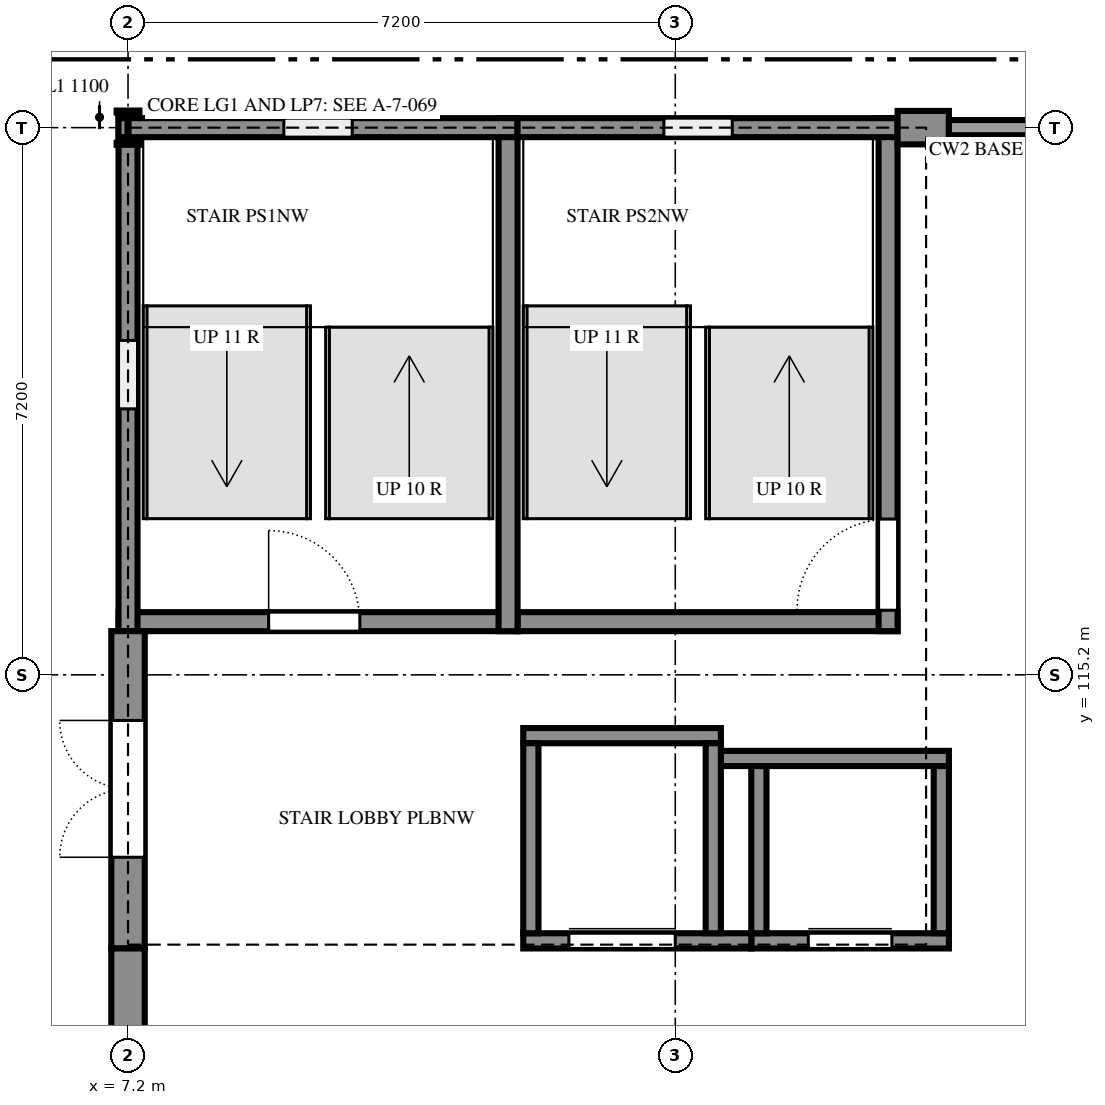
"""IFC4 building model, lengths in metres.
Left out: names, types, materials, properties, quantities, classifications, styles, units other than length and angle.
Written with IfcOpenShell. Run it as: python <this file> out.ifc"""

import sys

from ifc_helpers import new_model, si_unit, direction, frame, frame_2d, origin, origin_2d, place, context, subcontext, project, spatial, rectangle, i_section, extrude, element, fill, save


model = new_model("IFC4")
c1 = context("Model", 3, precision=1e-05, world=origin(), true_north=direction((0.0, 1.0)))
c2 = subcontext(c1, "Body", "Model", "MODEL_VIEW")
j1 = project(units=[si_unit("LENGTHUNIT", "METRE"), si_unit("PLANEANGLEUNIT", "RADIAN")], contexts=[c1])
p1 = place(None, origin())
s1 = spatial("IfcSite", under=j1, at=p1, CompositionType="ELEMENT")
p2 = place(p1, origin())
s2 = spatial("IfcBuilding", under=s1, at=p2, CompositionType="ELEMENT")
p3 = place(p2, frame((0.0, 0.0, 7.2)))
s3 = spatial("IfcBuildingStorey", under=s2, at=p3, CompositionType="ELEMENT", Elevation=7.2)
p4 = place(p3, frame((7.2, 122.4, 0.0), z_axis=(0.0, 0.0, 1.0), x_axis=(1.0, 0.0, 0.0)))
e1 = element("IfcColumn", 1, at=p4, inside=s3, PredefinedType="COLUMN", context=c2, shape_type="SweptSolid", body=[
    extrude(i_section(OverallWidth=0.3, OverallDepth=0.45, WebThickness=0.014, FlangeThickness=0.026, FilletRadius=0.027, at=origin_2d()), origin(), (0.0, 0.0, 1.0), 3.6),
])
p5 = place(p3, frame((7.075, 115.9, 0.0), z_axis=(0.0, 0.0, 1.0), x_axis=(1.0, 0.0, 0.0)))
e2 = element("IfcWall", 2, at=p5, inside=s3, PredefinedType="SHEAR", context=c2, shape_type="SweptSolid", body=[
    extrude(rectangle(XDim=5.25, YDim=0.25, at=frame_2d((2.625, 0.0))), origin(), (0.0, 0.0, 1.0), 3.6),
])
p6 = place(p5, frame((1.975, 0.0, 0.0)))
e3 = element("IfcOpeningElement", 3, at=p6, cuts=e2, PredefinedType="OPENING", context=c2, shape_type="SweptSolid", body=[
    extrude(rectangle(XDim=1.2, YDim=2.4, at=frame_2d((0.6, 1.2))), frame((0.0, 0.135, 0.0), z_axis=(0.0, -1.0, 0.0), x_axis=(1.0, 0.0, 0.0)), (0.0, 0.0, 1.0), 0.27),
])
p7 = place(p3, frame((12.325, 115.9, 0.0), z_axis=(0.0, 0.0, 1.0), x_axis=(1.0, 0.0, 0.0)))
e4 = element("IfcWall", 4, at=p7, inside=s3, PredefinedType="SHEAR", context=c2, shape_type="SweptSolid", body=[
    extrude(rectangle(XDim=5.0, YDim=0.25, at=frame_2d((2.5, 0.0))), origin(), (0.0, 0.0, 1.0), 3.6),
])
p8 = place(p3, frame((12.2, 115.775, 0.0), z_axis=(0.0, 0.0, 1.0), x_axis=(0.0, 1.0, 0.0)))
e5 = element("IfcWall", 5, at=p8, inside=s3, PredefinedType="SHEAR", context=c2, shape_type="SweptSolid", body=[
    extrude(rectangle(XDim=6.75, YDim=0.25, at=frame_2d((3.375, 0.0))), origin(), (0.0, 0.0, 1.0), 3.6),
])
p9 = place(p3, frame((17.2, 115.775, 0.0), z_axis=(0.0, 0.0, 1.0), x_axis=(0.0, 1.0, 0.0)))
e6 = element("IfcWall", 6, at=p9, inside=s3, PredefinedType="SHEAR", context=c2, shape_type="SweptSolid", body=[
    extrude(rectangle(XDim=6.75, YDim=0.25, at=frame_2d((3.375, 0.0))), origin(), (0.0, 0.0, 1.0), 3.6),
])
p10 = place(p9, frame((0.275, 0.0, 0.0)))
e7 = element("IfcOpeningElement", 7, at=p10, cuts=e6, PredefinedType="OPENING", context=c2, shape_type="SweptSolid", body=[
    extrude(rectangle(XDim=1.2, YDim=2.4, at=frame_2d((0.6, 1.2))), frame((0.0, 0.135, 0.0), z_axis=(0.0, -1.0, 0.0), x_axis=(1.0, 0.0, 0.0)), (0.0, 0.0, 1.0), 0.27),
])
p11 = place(p3, frame((7.2, 122.525, 0.0), z_axis=(0.0, 0.0, 1.0), x_axis=(0.0, -1.0, 0.0)))
e8 = element("IfcWall", 8, at=p11, inside=s3, PredefinedType="SHEAR", context=c2, shape_type="SweptSolid", body=[
    extrude(rectangle(XDim=6.75, YDim=0.25, at=frame_2d((3.375, 0.0))), origin(), (0.0, 0.0, 1.0), 3.6),
])
p12 = place(p11, frame((2.925, 0.0, 0.6)))
e9 = element("IfcOpeningElement", 9, at=p12, cuts=e8, PredefinedType="OPENING", context=c2, shape_type="SweptSolid", body=[
    extrude(rectangle(XDim=0.9, YDim=2.1, at=frame_2d((0.45, 1.05))), frame((0.0, 0.135, 0.0), z_axis=(0.0, -1.0, 0.0), x_axis=(1.0, 0.0, 0.0)), (0.0, 0.0, 1.0), 0.27),
])
p13 = place(p3, frame((12.325, 122.4, 0.0), z_axis=(0.0, 0.0, 1.0), x_axis=(-1.0, 0.0, 0.0)))
e10 = element("IfcWall", 10, at=p13, inside=s3, PredefinedType="SHEAR", context=c2, shape_type="SweptSolid", body=[
    extrude(rectangle(XDim=5.25, YDim=0.25, at=frame_2d((2.625, 0.0))), origin(), (0.0, 0.0, 1.0), 3.6),
])
p14 = place(p13, frame((2.175, 0.0, 0.6)))
e11 = element("IfcOpeningElement", 11, at=p14, cuts=e10, PredefinedType="OPENING", context=c2, shape_type="SweptSolid", body=[
    extrude(rectangle(XDim=0.9, YDim=2.1, at=frame_2d((0.45, 1.05))), frame((0.0, 0.135, 0.0), z_axis=(0.0, -1.0, 0.0), x_axis=(1.0, 0.0, 0.0)), (0.0, 0.0, 1.0), 0.27),
])
p15 = place(p3, frame((17.325, 122.4, 0.0), z_axis=(0.0, 0.0, 1.0), x_axis=(-1.0, 0.0, 0.0)))
e12 = element("IfcWall", 12, at=p15, inside=s3, PredefinedType="SHEAR", context=c2, shape_type="SweptSolid", body=[
    extrude(rectangle(XDim=5.0, YDim=0.25, at=frame_2d((2.5, 0.0))), origin(), (0.0, 0.0, 1.0), 3.6),
])
p16 = place(p15, frame((2.175, 0.0, 0.6)))
e13 = element("IfcOpeningElement", 13, at=p16, cuts=e12, PredefinedType="OPENING", context=c2, shape_type="SweptSolid", body=[
    extrude(rectangle(XDim=0.9, YDim=2.1, at=frame_2d((0.45, 1.05))), frame((0.0, 0.135, 0.0), z_axis=(0.0, -1.0, 0.0), x_axis=(1.0, 0.0, 0.0)), (0.0, 0.0, 1.0), 0.27),
])
p17 = place(p3, frame((18.0, 122.4, 0.0), z_axis=(0.0, 0.0, 1.0), x_axis=(-1.0, 0.0, 0.0)))
e14 = element("IfcWall", 14, at=p17, inside=s3, PredefinedType="SOLIDWALL", context=c2, shape_type="SweptSolid", body=[
    extrude(rectangle(XDim=0.675, YDim=0.44, at=frame_2d((0.337, 0.0))), origin(), (0.0, 0.0, 1.0), 3.42),
])
p18 = place(p3, frame((7.2, 115.775, 0.0), z_axis=(0.0, 0.0, 1.0), x_axis=(0.0, -1.0, 0.0)))
e15 = element("IfcWall", 15, at=p18, inside=s3, PredefinedType="SOLIDWALL", context=c2, shape_type="SweptSolid", body=[
    extrude(rectangle(XDim=4.175, YDim=0.44, at=frame_2d((2.087, 0.0))), origin(), (0.0, 0.0, 1.0), 3.42),
])
p19 = place(p18, frame((1.175, 0.0, 0.015)))
e16 = element("IfcOpeningElement", 16, at=p19, cuts=e15, PredefinedType="OPENING", context=c2, shape_type="SweptSolid", body=[
    extrude(rectangle(XDim=1.8, YDim=2.1, at=frame_2d((0.9, 1.05))), frame((0.0, 0.23, 0.0), z_axis=(0.0, -1.0, 0.0), x_axis=(1.0, 0.0, 0.0)), (0.0, 0.0, 1.0), 0.46),
])
p20 = place(p3, frame((7.2, 111.6, 0.0), z_axis=(0.0, 0.0, 1.0), x_axis=(0.0, -1.0, 0.0)))
e17 = element("IfcWall", 17, at=p20, inside=s3, PredefinedType="SOLIDWALL", context=c2, shape_type="SweptSolid", body=[
    extrude(rectangle(XDim=3.375, YDim=0.44, at=frame_2d((1.688, 0.0))), origin(), (0.0, 0.0, 1.0), 3.42),
])
p21 = place(p3, frame((15.4, 111.7, 0.0), z_axis=(0.0, 0.0, 1.0), x_axis=(1.0, 0.0, 0.0)))
e18 = element("IfcWall", 18, at=p21, inside=s3, PredefinedType="SHEAR", context=c2, shape_type="SweptSolid", body=[
    extrude(rectangle(XDim=2.6, YDim=0.2, at=frame_2d((1.3, 0.0))), origin(), (0.0, 0.0, 1.0), 3.6),
])
p22 = place(p21, frame((0.75, 0.0, 0.0)))
e19 = element("IfcOpeningElement", 19, at=p22, cuts=e18, PredefinedType="OPENING", context=c2, shape_type="SweptSolid", body=[
    extrude(rectangle(XDim=1.1, YDim=2.1, at=frame_2d((0.55, 1.05))), frame((0.0, 0.11, 0.0), z_axis=(0.0, -1.0, 0.0), x_axis=(1.0, 0.0, 0.0)), (0.0, 0.0, 1.0), 0.22),
])
p23 = place(p3, frame((15.0, 114.1, 0.0), z_axis=(0.0, 0.0, 1.0), x_axis=(1.0, 0.0, 0.0)))
e20 = element("IfcWall", 20, at=p23, inside=s3, PredefinedType="SHEAR", context=c2, shape_type="SweptSolid", body=[
    extrude(rectangle(XDim=3.0, YDim=0.2, at=frame_2d((1.5, 0.0))), origin(), (0.0, 0.0, 1.0), 3.6),
])
for number, where, z_axis, x_axis in (
    (21, (15.5, 111.8, 0.0), (0.0, 0.0, 1.0), (0.0, 1.0, 0.0)),
    (22, (17.9, 111.8, 0.0), (0.0, 0.0, 1.0), (0.0, 1.0, 0.0)),
):
    element("IfcWall", number, at=place(p3, frame(where, z_axis=z_axis, x_axis=x_axis)), inside=s3, PredefinedType="SHEAR", context=c2, shape_type="SweptSolid", body=[
        extrude(rectangle(XDim=2.2, YDim=0.2, at=frame_2d((1.1, 0.0))), origin(), (0.0, 0.0, 1.0), 3.6),
    ])
p24 = place(p3, frame((12.4, 111.7, 0.0), z_axis=(0.0, 0.0, 1.0), x_axis=(1.0, 0.0, 0.0)))
e23 = element("IfcWall", 23, at=p24, inside=s3, PredefinedType="SHEAR", context=c2, shape_type="SweptSolid", body=[
    extrude(rectangle(XDim=3.0, YDim=0.2, at=frame_2d((1.5, 0.0))), origin(), (0.0, 0.0, 1.0), 3.6),
])
p25 = place(p24, frame((0.6, 0.0, 0.0)))
e24 = element("IfcOpeningElement", 24, at=p25, cuts=e23, PredefinedType="OPENING", context=c2, shape_type="SweptSolid", body=[
    extrude(rectangle(XDim=1.4, YDim=2.1, at=frame_2d((0.7, 1.05))), frame((0.0, 0.11, 0.0), z_axis=(0.0, -1.0, 0.0), x_axis=(1.0, 0.0, 0.0)), (0.0, 0.0, 1.0), 0.22),
])
p26 = place(p3, frame((12.4, 114.4, 0.0), z_axis=(0.0, 0.0, 1.0), x_axis=(1.0, 0.0, 0.0)))
e25 = element("IfcWall", 25, at=p26, inside=s3, PredefinedType="SHEAR", context=c2, shape_type="SweptSolid", body=[
    extrude(rectangle(XDim=2.6, YDim=0.2, at=frame_2d((1.3, 0.0))), origin(), (0.0, 0.0, 1.0), 3.6),
])
for number, where, z_axis, x_axis in (
    (26, (12.5, 111.8, 0.0), (0.0, 0.0, 1.0), (0.0, 1.0, 0.0)),
    (27, (14.9, 111.8, 0.0), (0.0, 0.0, 1.0), (0.0, 1.0, 0.0)),
):
    element("IfcWall", number, at=place(p3, frame(where, z_axis=z_axis, x_axis=x_axis)), inside=s3, PredefinedType="SHEAR", context=c2, shape_type="SweptSolid", body=[
        extrude(rectangle(XDim=2.5, YDim=0.2, at=frame_2d((1.25, 0.0))), origin(), (0.0, 0.0, 1.0), 3.6),
    ])
p27 = place(p16, origin())
e28 = element("IfcWindow", 28, at=p27, inside=s3, PartitioningType="SINGLE_PANEL", PredefinedType="WINDOW", context=c2, shape_type="SweptSolid", body=[
    extrude(rectangle(XDim=0.9, YDim=2.1, at=frame_2d((0.45, 1.05))), frame((0.0, 0.03, 0.0), z_axis=(0.0, -1.0, 0.0), x_axis=(1.0, 0.0, 0.0)), (0.0, 0.0, 1.0), 0.06),
])
fill(e13, e28)
p28 = place(p14, origin())
e29 = element("IfcWindow", 29, at=p28, inside=s3, PartitioningType="SINGLE_PANEL", PredefinedType="WINDOW", context=c2, shape_type="SweptSolid", body=[
    extrude(rectangle(XDim=0.9, YDim=2.1, at=frame_2d((0.45, 1.05))), frame((0.0, 0.03, 0.0), z_axis=(0.0, -1.0, 0.0), x_axis=(1.0, 0.0, 0.0)), (0.0, 0.0, 1.0), 0.06),
])
fill(e11, e29)
p29 = place(p12, origin())
e30 = element("IfcWindow", 30, at=p29, inside=s3, PartitioningType="SINGLE_PANEL", PredefinedType="WINDOW", context=c2, shape_type="SweptSolid", body=[
    extrude(rectangle(XDim=0.9, YDim=2.1, at=frame_2d((0.45, 1.05))), frame((0.0, 0.03, 0.0), z_axis=(0.0, -1.0, 0.0), x_axis=(1.0, 0.0, 0.0)), (0.0, 0.0, 1.0), 0.06),
])
fill(e9, e30)
p30 = place(p19, frame((1.8, 0.0, 0.0), z_axis=(0.0, 0.0, 1.0), x_axis=(-1.0, 0.0, 0.0)))
e31 = element("IfcDoor", 31, at=p30, inside=s3, OperationType="DOUBLE_DOOR_SINGLE_SWING", PredefinedType="DOOR", context=c2, shape_type="SweptSolid", body=[
    extrude(rectangle(XDim=1.8, YDim=2.1, at=frame_2d((0.9, 1.05))), frame((0.0, 0.025, 0.0), z_axis=(0.0, -1.0, 0.0), x_axis=(1.0, 0.0, 0.0)), (0.0, 0.0, 1.0), 0.05),
])
fill(e16, e31)
p31 = place(p22, origin())
e32 = element("IfcDoor", 32, at=p31, inside=s3, OperationType="SLIDING_TO_LEFT", PredefinedType="DOOR", context=c2, shape_type="SweptSolid", body=[
    extrude(rectangle(XDim=1.1, YDim=2.1, at=frame_2d((0.55, 1.05))), frame((0.0, 0.025, 0.0), z_axis=(0.0, -1.0, 0.0), x_axis=(1.0, 0.0, 0.0)), (0.0, 0.0, 1.0), 0.05),
])
fill(e19, e32)
p32 = place(p25, origin())
e33 = element("IfcDoor", 33, at=p32, inside=s3, OperationType="SLIDING_TO_LEFT", PredefinedType="DOOR", context=c2, shape_type="SweptSolid", body=[
    extrude(rectangle(XDim=1.4, YDim=2.1, at=frame_2d((0.7, 1.05))), frame((0.0, 0.025, 0.0), z_axis=(0.0, -1.0, 0.0), x_axis=(1.0, 0.0, 0.0)), (0.0, 0.0, 1.0), 0.05),
])
fill(e24, e33)
p33 = place(p6, origin())
e34 = element("IfcDoor", 34, at=p33, inside=s3, OperationType="SINGLE_SWING_RIGHT", PredefinedType="DOOR", context=c2, shape_type="SweptSolid", body=[
    extrude(rectangle(XDim=1.2, YDim=2.4, at=frame_2d((0.6, 1.2))), frame((0.0, 0.025, 0.0), z_axis=(0.0, -1.0, 0.0), x_axis=(1.0, 0.0, 0.0)), (0.0, 0.0, 1.0), 0.05),
])
fill(e3, e34)
p34 = place(p10, origin())
e35 = element("IfcDoor", 35, at=p34, inside=s3, OperationType="SINGLE_SWING_RIGHT", PredefinedType="DOOR", context=c2, shape_type="SweptSolid", body=[
    extrude(rectangle(XDim=1.2, YDim=2.4, at=frame_2d((0.6, 1.2))), frame((0.0, 0.025, 0.0), z_axis=(0.0, -1.0, 0.0), x_axis=(1.0, 0.0, 0.0)), (0.0, 0.0, 1.0), 0.05),
])
fill(e7, e35)
save(model, sys.argv[1])
